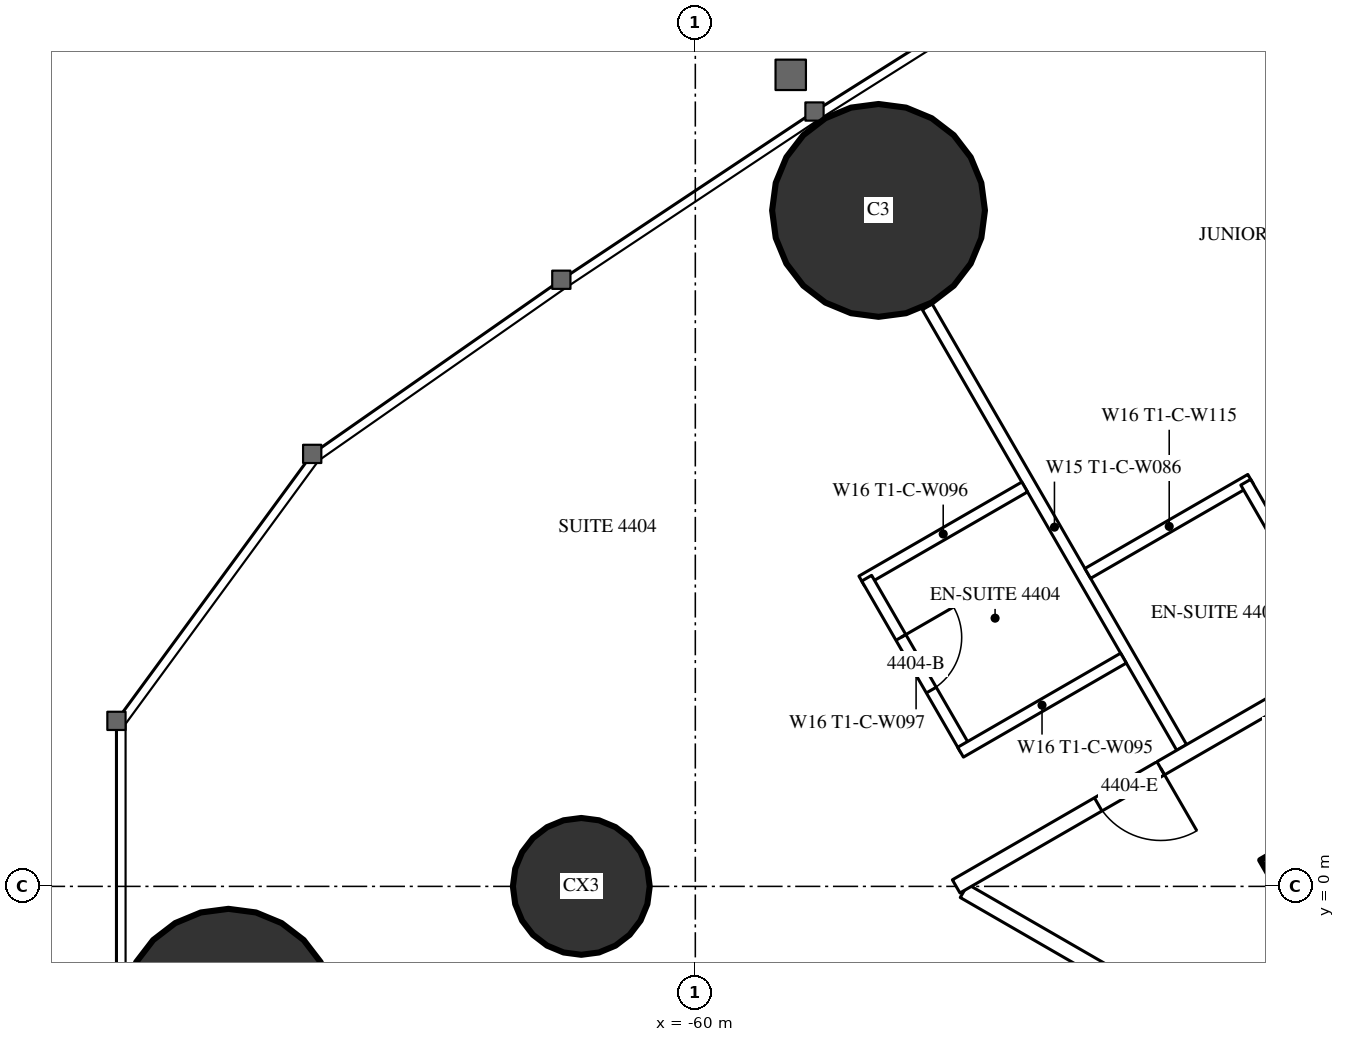
"""IFC4 building model, lengths in metres.
Left out: names, types, materials, properties, quantities, classifications, styles, units other than length and angle.
Written with IfcOpenShell. Run it as: python <this file> out.ifc"""

import sys

from ifc_helpers import new_model, si_unit, direction, frame, frame_2d, origin, origin_2d, place, context, subcontext, project, spatial, rectangle, circle, extrude, element, fill, save


model = new_model("IFC4")
c1 = context("Model", 3, precision=1e-05, world=origin(), true_north=direction((0.0, 1.0)))
c2 = subcontext(c1, "Body", "Model", "MODEL_VIEW")
j1 = project(units=[si_unit("LENGTHUNIT", "METRE"), si_unit("PLANEANGLEUNIT", "RADIAN")], contexts=[c1])
p1 = place(None, origin())
s1 = spatial("IfcSite", under=j1, at=p1, CompositionType="ELEMENT")
p2 = place(p1, origin())
s2 = spatial("IfcBuilding", under=s1, at=p2, CompositionType="ELEMENT")
p3 = place(p2, frame((0.0, 0.0, 166.8)))
s3 = spatial("IfcBuildingStorey", under=s2, at=p3, CompositionType="ELEMENT", Elevation=166.8)
for number, where, z_axis, x_axis in (
    (1, (-66.143, -1.695, 0.0), (0.0, 0.0, 1.0), (1.0, 0.0, 0.0)),
    (2, (-57.59, 8.893, 0.0), (0.0, 0.0, 1.0), (1.0, 0.0, 0.0)),
):
    element("IfcColumn", number, at=place(p3, frame(where, z_axis=z_axis, x_axis=x_axis)), inside=s3, PredefinedType="COLUMN", context=c2, shape_type="SweptSolid", body=[
        extrude(circle(Radius=1.4, at=origin_2d()), origin(), (0.0, 0.0, 1.0), 3.5),
    ])
p4 = place(p3, frame((-61.5, 0.0, 0.0), z_axis=(0.0, 0.0, 1.0), x_axis=(1.0, 0.0, 0.0)))
e3 = element("IfcColumn", 3, at=p4, inside=s3, PredefinedType="COLUMN", context=c2, shape_type="SweptSolid", body=[
    extrude(circle(Radius=0.9, at=origin_2d()), origin(), (0.0, 0.0, 1.0), 3.5),
])
p5 = place(p3, frame((-27.2, 14.3, 0.0), z_axis=(0.0, 0.0, 1.0), x_axis=(-0.866026593062, -0.499997940104, 0.0)))
e4 = element("IfcWall", 4, at=p5, inside=s3, PredefinedType="SHEAR", context=c2, shape_type="SweptSolid", body=[
    extrude(rectangle(XDim=28.946, YDim=1.2, at=frame_2d((14.473, 0.0))), origin(), (0.0, 0.0, 1.0), 3.5),
])
p6 = place(p5, frame((4.6, 0.0, 0.0)))
e5 = element("IfcOpeningElement", 5, at=p6, cuts=e4, PredefinedType="OPENING", context=c2, shape_type="SweptSolid", body=[
    extrude(rectangle(XDim=1.0, YDim=2.2, at=frame_2d((0.5, 1.1))), frame((0.0, 0.61, 0.0), z_axis=(0.0, -1.0, 0.0), x_axis=(1.0, 0.0, 0.0)), (0.0, 0.0, 1.0), 1.22),
])
p7 = place(p5, frame((13.395, 0.0, 0.0)))
e6 = element("IfcOpeningElement", 6, at=p7, cuts=e4, PredefinedType="OPENING", context=c2, shape_type="SweptSolid", body=[
    extrude(rectangle(XDim=1.8, YDim=2.2, at=frame_2d((0.9, 1.1))), frame((0.0, 0.61, 0.0), z_axis=(0.0, -1.0, 0.0), x_axis=(1.0, 0.0, 0.0)), (0.0, 0.0, 1.0), 1.22),
])
p8 = place(p3, frame((-53.602, 1.828, 0.0), z_axis=(0.0, 0.0, 1.0), x_axis=(-0.49999191814, 0.866030069798, 0.0)))
e7 = element("IfcWall", 7, at=p8, inside=s3, PredefinedType="PARTITIONING", context=c2, shape_type="SweptSolid", body=[
    extrude(rectangle(XDim=6.692, YDim=0.15, at=frame_2d((3.346, 0.0))), origin(), (0.0, 0.0, 1.0), 2.3),
])
p9 = place(p3, frame((-44.715, -6.844, 0.0), z_axis=(0.0, 0.0, 1.0), x_axis=(-0.866025261224, 0.500000246922, 0.0)))
e8 = element("IfcWall", 8, at=p9, inside=s3, PredefinedType="PARTITIONING", context=c2, shape_type="SweptSolid", body=[
    extrude(rectangle(XDim=13.567, YDim=0.2, at=frame_2d((6.783, 0.0))), origin(), (0.0, 0.0, 1.0), 3.25),
])
p10 = place(p9, frame((10.579, 0.0, 0.0)))
e9 = element("IfcOpeningElement", 9, at=p10, cuts=e8, PredefinedType="OPENING", context=c2, shape_type="SweptSolid", body=[
    extrude(rectangle(XDim=0.95, YDim=2.2, at=frame_2d((0.475, 1.1))), frame((0.0, 0.11, 0.0), z_axis=(0.0, -1.0, 0.0), x_axis=(1.0, 0.0, 0.0)), (0.0, 0.0, 1.0), 0.22),
])
p11 = place(p9, frame((8.879, 0.0, 0.0)))
e10 = element("IfcOpeningElement", 10, at=p11, cuts=e8, PredefinedType="OPENING", context=c2, shape_type="SweptSolid", body=[
    extrude(rectangle(XDim=0.95, YDim=2.2, at=frame_2d((0.475, 1.1))), frame((0.0, 0.11, 0.0), z_axis=(0.0, -1.0, 0.0), x_axis=(1.0, 0.0, 0.0)), (0.0, 0.0, 1.0), 0.22),
])
p12 = place(p9, frame((0.5, 0.0, 0.0)))
e11 = element("IfcOpeningElement", 11, at=p12, cuts=e8, PredefinedType="OPENING", context=c2, shape_type="SweptSolid", body=[
    extrude(rectangle(XDim=1.435, YDim=2.2, at=frame_2d((0.718, 1.1))), frame((0.0, 0.11, 0.0), z_axis=(0.0, -1.0, 0.0), x_axis=(1.0, 0.0, 0.0)), (0.0, 0.0, 1.0), 0.22),
])
p13 = place(p3, frame((-46.65, 5.726, 0.0), z_axis=(0.0, 0.0, 1.0), x_axis=(-0.866027963864, -0.499995565786, 0.0)))
e12 = element("IfcWall", 12, at=p13, inside=s3, PredefinedType="PARTITIONING", context=c2, shape_type="SweptSolid", body=[
    extrude(rectangle(XDim=11.452, YDim=0.2, at=frame_2d((5.726, 0.0))), origin(), (0.0, 0.0, 1.0), 3.25),
])
p14 = place(p13, frame((4.294, 0.0, 0.0)))
e13 = element("IfcOpeningElement", 13, at=p14, cuts=e12, PredefinedType="OPENING", context=c2, shape_type="SweptSolid", body=[
    extrude(rectangle(XDim=0.95, YDim=2.2, at=frame_2d((0.475, 1.1))), frame((0.0, 0.11, 0.0), z_axis=(0.0, -1.0, 0.0), x_axis=(1.0, 0.0, 0.0)), (0.0, 0.0, 1.0), 0.22),
])
p15 = place(p13, frame((8.344, 0.0, 0.0)))
e14 = element("IfcOpeningElement", 14, at=p15, cuts=e12, PredefinedType="OPENING", context=c2, shape_type="SweptSolid", body=[
    extrude(rectangle(XDim=0.95, YDim=2.2, at=frame_2d((0.475, 1.1))), frame((0.0, 0.11, 0.0), z_axis=(0.0, -1.0, 0.0), x_axis=(1.0, 0.0, 0.0)), (0.0, 0.0, 1.0), 0.22),
])
p16 = place(p3, frame((-52.694, 5.355, 0.0), z_axis=(0.0, 0.0, 1.0), x_axis=(-0.866031185235, -0.4999899861, 0.0)))
e15 = element("IfcWall", 15, at=p16, inside=s3, PredefinedType="PARTITIONING", context=c2, shape_type="SweptSolid", body=[
    extrude(rectangle(XDim=2.475, YDim=0.15, at=frame_2d((1.238, 0.0))), origin(), (0.0, 0.0, 1.0), 3.25),
])
p17 = place(p3, frame((-51.459, 3.065, 0.0), z_axis=(0.0, 0.0, 1.0), x_axis=(-0.499936506574, 0.866062058628, 0.0)))
e16 = element("IfcWall", 16, at=p17, inside=s3, PredefinedType="PARTITIONING", context=c2, shape_type="SweptSolid", body=[
    extrude(rectangle(XDim=2.6, YDim=0.15, at=frame_2d((1.3, 0.0))), origin(), (0.0, 0.0, 1.0), 3.25),
])
p18 = place(p17, frame((0.9, 0.0, 0.0)))
e17 = element("IfcOpeningElement", 17, at=p18, cuts=e16, PredefinedType="OPENING", context=c2, shape_type="SweptSolid", body=[
    extrude(rectangle(XDim=0.8, YDim=2.2, at=frame_2d((0.4, 1.1))), frame((0.0, 0.085, 0.0), z_axis=(0.0, -1.0, 0.0), x_axis=(1.0, 0.0, 0.0)), (0.0, 0.0, 1.0), 0.17),
])
p19 = place(p3, frame((-55.667, 5.255, 0.0), z_axis=(0.0, 0.0, 1.0), x_axis=(-0.866006523861, -0.500032699561, 0.0)))
e18 = element("IfcWall", 18, at=p19, inside=s3, PredefinedType="PARTITIONING", context=c2, shape_type="SweptSolid", body=[
    extrude(rectangle(XDim=2.475, YDim=0.15, at=frame_2d((1.237, 0.0))), origin(), (0.0, 0.0, 1.0), 3.25),
])
p20 = place(p3, frame((-56.446, 1.803, 0.0), z_axis=(0.0, 0.0, 1.0), x_axis=(-0.499936506574, 0.866062058628, 0.0)))
e19 = element("IfcWall", 19, at=p20, inside=s3, PredefinedType="PARTITIONING", context=c2, shape_type="SweptSolid", body=[
    extrude(rectangle(XDim=2.6, YDim=0.15, at=frame_2d((1.3, 0.0))), origin(), (0.0, 0.0, 1.0), 3.25),
])
p21 = place(p20, frame((0.9, 0.0, 0.0)))
e20 = element("IfcOpeningElement", 20, at=p21, cuts=e19, PredefinedType="OPENING", context=c2, shape_type="SweptSolid", body=[
    extrude(rectangle(XDim=0.8, YDim=2.2, at=frame_2d((0.4, 1.1))), frame((0.0, 0.085, 0.0), z_axis=(0.0, -1.0, 0.0), x_axis=(1.0, 0.0, 0.0)), (0.0, 0.0, 1.0), 0.17),
])
p22 = place(p3, frame((-54.367, 3.003, 0.0), z_axis=(0.0, 0.0, 1.0), x_axis=(-0.866031185235, -0.4999899861, 0.0)))
e21 = element("IfcWall", 21, at=p22, inside=s3, PredefinedType="PARTITIONING", context=c2, shape_type="SweptSolid", body=[
    extrude(rectangle(XDim=2.475, YDim=0.15, at=frame_2d((1.238, 0.0))), origin(), (0.0, 0.0, 1.0), 3.25),
])
p23 = place(p21, origin())
e22 = element("IfcDoor", 22, at=p23, inside=s3, OperationType="SINGLE_SWING_RIGHT", PredefinedType="DOOR", context=c2, shape_type="SweptSolid", body=[
    extrude(rectangle(XDim=0.8, YDim=2.2, at=frame_2d((0.4, 1.1))), frame((0.0, 0.025, 0.0), z_axis=(0.0, -1.0, 0.0), x_axis=(1.0, 0.0, 0.0)), (0.0, 0.0, 1.0), 0.05),
])
fill(e20, e22)
p24 = place(p15, origin())
e23 = element("IfcDoor", 23, at=p24, inside=s3, OperationType="SINGLE_SWING_LEFT", PredefinedType="DOOR", context=c2, shape_type="SweptSolid", body=[
    extrude(rectangle(XDim=0.95, YDim=2.2, at=frame_2d((0.475, 1.1))), frame((0.0, 0.025, 0.0), z_axis=(0.0, -1.0, 0.0), x_axis=(1.0, 0.0, 0.0)), (0.0, 0.0, 1.0), 0.05),
])
fill(e14, e23)
save(model, sys.argv[1])
